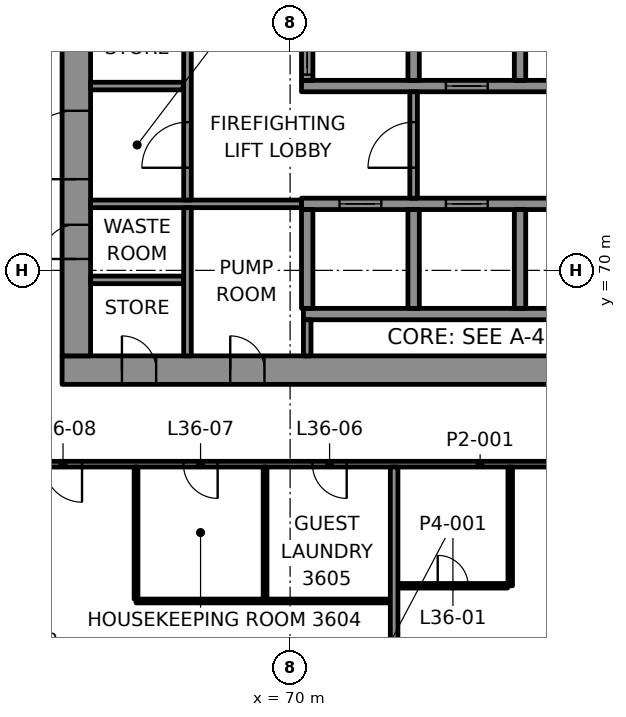
"""IFC4 building model, lengths in metres.
Left out: names, types, materials, properties, quantities, classifications, styles, units other than length and angle.
Written with IfcOpenShell. Run it as: python <this file> out.ifc"""

import sys

from ifc_helpers import new_model, si_unit, direction, frame, frame_2d, origin, place, context, subcontext, project, spatial, rectangle, extrude, element, fill, save


model = new_model("IFC4")
c1 = context("Model", 3, precision=1e-05, world=origin(), true_north=direction((0.0, 1.0)))
c2 = subcontext(c1, "Body", "Model", "MODEL_VIEW")
j1 = project(units=[si_unit("LENGTHUNIT", "METRE"), si_unit("PLANEANGLEUNIT", "RADIAN")], contexts=[c1])
p1 = place(None, origin())
s1 = spatial("IfcSite", under=j1, at=p1, CompositionType="ELEMENT")
p2 = place(p1, origin())
s2 = spatial("IfcBuilding", under=s1, at=p2, CompositionType="ELEMENT")
p3 = place(p2, frame((0.0, 0.0, 159.7)))
s3 = spatial("IfcBuildingStorey", under=s2, at=p3, CompositionType="ELEMENT", Elevation=159.7)
p4 = place(p3, frame((64.0, 67.375, 0.0), z_axis=(0.0, 0.0, 1.0), x_axis=(1.0, 0.0, 0.0)))
e1 = element("IfcWall", 1, at=p4, inside=s3, PredefinedType="SHEAR", context=c2, shape_type="SweptSolid", body=[
    extrude(rectangle(XDim=22.0, YDim=0.75, at=frame_2d((11.0, 0.0))), origin(), (0.0, 0.0, 1.0), 3.7),
])
p5 = place(p4, frame((1.575, 0.0, 0.0)))
e2 = element("IfcOpeningElement", 2, at=p5, cuts=e1, PredefinedType="OPENING", context=c2, shape_type="SweptSolid", body=[
    extrude(rectangle(XDim=0.9, YDim=2.1, at=frame_2d((0.45, 1.05))), frame((0.0, 0.385, 0.0), z_axis=(0.0, -1.0, 0.0), x_axis=(1.0, 0.0, 0.0)), (0.0, 0.0, 1.0), 0.77),
])
p6 = place(p4, frame((4.425, 0.0, 0.0)))
e3 = element("IfcOpeningElement", 3, at=p6, cuts=e1, PredefinedType="OPENING", context=c2, shape_type="SweptSolid", body=[
    extrude(rectangle(XDim=0.9, YDim=2.1, at=frame_2d((0.45, 1.05))), frame((0.0, 0.385, 0.0), z_axis=(0.0, -1.0, 0.0), x_axis=(1.0, 0.0, 0.0)), (0.0, 0.0, 1.0), 0.77),
])
p7 = place(p3, frame((64.375, 67.75, 0.0), z_axis=(0.0, 0.0, 1.0), x_axis=(0.0, 1.0, 0.0)))
e4 = element("IfcWall", 4, at=p7, inside=s3, PredefinedType="SHEAR", context=c2, shape_type="SweptSolid", body=[
    extrude(rectangle(XDim=14.5, YDim=0.75, at=frame_2d((7.25, 0.0))), origin(), (0.0, 0.0, 1.0), 3.7),
])
p8 = place(p7, frame((4.65, 0.0, 0.0)))
e5 = element("IfcOpeningElement", 5, at=p8, cuts=e4, PredefinedType="OPENING", context=c2, shape_type="SweptSolid", body=[
    extrude(rectangle(XDim=1.8, YDim=2.1, at=frame_2d((0.9, 1.05))), frame((0.0, 0.385, 0.0), z_axis=(0.0, -1.0, 0.0), x_axis=(1.0, 0.0, 0.0)), (0.0, 0.0, 1.0), 0.77),
])
p9 = place(p7, frame((2.55, 0.0, 0.0)))
e6 = element("IfcOpeningElement", 6, at=p9, cuts=e4, PredefinedType="OPENING", context=c2, shape_type="SweptSolid", body=[
    extrude(rectangle(XDim=0.9, YDim=2.1, at=frame_2d((0.45, 1.05))), frame((0.0, 0.385, 0.0), z_axis=(0.0, -1.0, 0.0), x_axis=(1.0, 0.0, 0.0)), (0.0, 0.0, 1.0), 0.77),
])
p10 = place(p7, frame((10.35, 0.0, 0.0)))
e7 = element("IfcOpeningElement", 7, at=p10, cuts=e4, PredefinedType="OPENING", context=c2, shape_type="SweptSolid", body=[
    extrude(rectangle(XDim=0.9, YDim=2.1, at=frame_2d((0.45, 1.05))), frame((0.0, 0.385, 0.0), z_axis=(0.0, -1.0, 0.0), x_axis=(1.0, 0.0, 0.0)), (0.0, 0.0, 1.0), 0.77),
])
p11 = place(p3, frame((70.35, 68.85, 0.0), z_axis=(0.0, 0.0, 1.0), x_axis=(1.0, 0.0, 0.0)))
e8 = element("IfcWall", 8, at=p11, inside=s3, PredefinedType="SHEAR", context=c2, shape_type="SweptSolid", body=[
    extrude(rectangle(XDim=14.2, YDim=0.3, at=frame_2d((7.1, 0.0))), origin(), (0.0, 0.0, 1.0), 3.7),
])
p12 = place(p3, frame((70.3, 71.75, 0.0), z_axis=(0.0, 0.0, 1.0), x_axis=(1.0, 0.0, 0.0)))
e9 = element("IfcWall", 9, at=p12, inside=s3, PredefinedType="SHEAR", context=c2, shape_type="SweptSolid", body=[
    extrude(rectangle(XDim=14.3, YDim=0.3, at=frame_2d((7.15, 0.0))), origin(), (0.0, 0.0, 1.0), 3.7),
])
p13 = place(p12, frame((1.0, 0.0, 0.0)))
e10 = element("IfcOpeningElement", 10, at=p13, cuts=e9, PredefinedType="OPENING", context=c2, shape_type="SweptSolid", body=[
    extrude(rectangle(XDim=1.1, YDim=2.1, at=frame_2d((0.55, 1.05))), frame((0.0, 0.16, 0.0), z_axis=(0.0, -1.0, 0.0), x_axis=(1.0, 0.0, 0.0)), (0.0, 0.0, 1.0), 0.32),
])
p14 = place(p12, frame((3.8, 0.0, 0.0)))
e11 = element("IfcOpeningElement", 11, at=p14, cuts=e9, PredefinedType="OPENING", context=c2, shape_type="SweptSolid", body=[
    extrude(rectangle(XDim=1.1, YDim=2.1, at=frame_2d((0.55, 1.05))), frame((0.0, 0.16, 0.0), z_axis=(0.0, -1.0, 0.0), x_axis=(1.0, 0.0, 0.0)), (0.0, 0.0, 1.0), 0.32),
])
p15 = place(p12, frame((6.6, 0.0, 0.0)))
e12 = element("IfcOpeningElement", 12, at=p15, cuts=e9, PredefinedType="OPENING", context=c2, shape_type="SweptSolid", body=[
    extrude(rectangle(XDim=1.1, YDim=2.1, at=frame_2d((0.55, 1.05))), frame((0.0, 0.16, 0.0), z_axis=(0.0, -1.0, 0.0), x_axis=(1.0, 0.0, 0.0)), (0.0, 0.0, 1.0), 0.32),
])
p16 = place(p12, frame((9.4, 0.0, 0.0)))
e13 = element("IfcOpeningElement", 13, at=p16, cuts=e9, PredefinedType="OPENING", context=c2, shape_type="SweptSolid", body=[
    extrude(rectangle(XDim=1.1, YDim=2.1, at=frame_2d((0.55, 1.05))), frame((0.0, 0.16, 0.0), z_axis=(0.0, -1.0, 0.0), x_axis=(1.0, 0.0, 0.0)), (0.0, 0.0, 1.0), 0.32),
])
p17 = place(p12, frame((12.2, 0.0, 0.0)))
e14 = element("IfcOpeningElement", 14, at=p17, cuts=e9, PredefinedType="OPENING", context=c2, shape_type="SweptSolid", body=[
    extrude(rectangle(XDim=1.1, YDim=2.1, at=frame_2d((0.55, 1.05))), frame((0.0, 0.16, 0.0), z_axis=(0.0, -1.0, 0.0), x_axis=(1.0, 0.0, 0.0)), (0.0, 0.0, 1.0), 0.32),
])
p18 = place(p3, frame((70.3, 74.85, 0.0), z_axis=(0.0, 0.0, 1.0), x_axis=(1.0, 0.0, 0.0)))
e15 = element("IfcWall", 15, at=p18, inside=s3, PredefinedType="SHEAR", context=c2, shape_type="SweptSolid", body=[
    extrude(rectangle(XDim=14.3, YDim=0.3, at=frame_2d((7.15, 0.0))), origin(), (0.0, 0.0, 1.0), 3.7),
])
p19 = place(p18, frame((3.8, 0.0, 0.0)))
e16 = element("IfcOpeningElement", 16, at=p19, cuts=e15, PredefinedType="OPENING", context=c2, shape_type="SweptSolid", body=[
    extrude(rectangle(XDim=1.1, YDim=2.1, at=frame_2d((0.55, 1.05))), frame((0.0, 0.16, 0.0), z_axis=(0.0, -1.0, 0.0), x_axis=(1.0, 0.0, 0.0)), (0.0, 0.0, 1.0), 0.32),
])
p20 = place(p18, frame((12.2, 0.0, 0.0)))
e17 = element("IfcOpeningElement", 17, at=p20, cuts=e15, PredefinedType="OPENING", context=c2, shape_type="SweptSolid", body=[
    extrude(rectangle(XDim=1.1, YDim=2.1, at=frame_2d((0.55, 1.05))), frame((0.0, 0.16, 0.0), z_axis=(0.0, -1.0, 0.0), x_axis=(1.0, 0.0, 0.0)), (0.0, 0.0, 1.0), 0.32),
])
p21 = place(p3, frame((70.45, 69.0, 0.0), z_axis=(0.0, 0.0, 1.0), x_axis=(0.0, 1.0, 0.0)))
e18 = element("IfcWall", 18, at=p21, inside=s3, PredefinedType="SHEAR", context=c2, shape_type="SweptSolid", body=[
    extrude(rectangle(XDim=2.6, YDim=0.3, at=frame_2d((1.3, 0.0))), origin(), (0.0, 0.0, 1.0), 3.7),
])
p22 = place(p3, frame((70.45, 75.0, 0.0), z_axis=(0.0, 0.0, 1.0), x_axis=(0.0, 1.0, 0.0)))
e19 = element("IfcWall", 19, at=p22, inside=s3, PredefinedType="SHEAR", context=c2, shape_type="SweptSolid", body=[
    extrude(rectangle(XDim=2.6, YDim=0.3, at=frame_2d((1.3, 0.0))), origin(), (0.0, 0.0, 1.0), 3.7),
])
p23 = place(p22, frame((0.15, 0.0, 0.0)))
e20 = element("IfcOpeningElement", 20, at=p23, cuts=e19, PredefinedType="OPENING", context=c2, shape_type="SweptSolid", body=[
    extrude(rectangle(XDim=1.1, YDim=2.1, at=frame_2d((0.55, 1.05))), frame((0.0, 0.16, 0.0), z_axis=(0.0, -1.0, 0.0), x_axis=(1.0, 0.0, 0.0)), (0.0, 0.0, 1.0), 0.32),
])
for number, where, z_axis, x_axis in (
    (21, (73.25, 69.0, 0.0), (0.0, 0.0, 1.0), (0.0, 1.0, 0.0)),
    (22, (73.25, 75.0, 0.0), (0.0, 0.0, 1.0), (0.0, 1.0, 0.0)),
    (23, (76.05, 69.0, 0.0), (0.0, 0.0, 1.0), (0.0, 1.0, 0.0)),
    (24, (76.05, 75.0, 0.0), (0.0, 0.0, 1.0), (0.0, 1.0, 0.0)),
):
    element("IfcWall", number, at=place(p3, frame(where, z_axis=z_axis, x_axis=x_axis)), inside=s3, PredefinedType="SHEAR", context=c2, shape_type="SweptSolid", body=[
        extrude(rectangle(XDim=2.6, YDim=0.3, at=frame_2d((1.3, 0.0))), origin(), (0.0, 0.0, 1.0), 3.7),
    ])
p24 = place(p3, frame((65.946, 61.3, 0.0), z_axis=(0.0, 0.0, 1.0), x_axis=(1.0, 0.0, 0.0)))
e25 = element("IfcWall", 25, at=p24, inside=s3, PredefinedType="PARTITIONING", context=c2, shape_type="SweptSolid", body=[
    extrude(rectangle(XDim=6.69, YDim=0.1, at=frame_2d((3.345, 0.0))), origin(), (0.0, 0.0, 1.0), 3.1),
])
p25 = place(p3, frame((72.846, 61.7, 0.0), z_axis=(0.0, 0.0, 1.0), x_axis=(1.0, 0.0, 0.0)))
e26 = element("IfcWall", 26, at=p25, inside=s3, PredefinedType="PARTITIONING", context=c2, shape_type="SweptSolid", body=[
    extrude(rectangle(XDim=2.876, YDim=0.12, at=frame_2d((1.438, 0.0))), origin(), (0.0, 0.0, 1.0), 3.1),
])
p26 = place(p25, frame((1.038, 0.0, 0.0)))
e27 = element("IfcOpeningElement", 27, at=p26, cuts=e26, PredefinedType="OPENING", context=c2, shape_type="SweptSolid", body=[
    extrude(rectangle(XDim=0.8, YDim=2.1, at=frame_2d((0.4, 1.05))), frame((0.0, 0.07, 0.0), z_axis=(0.0, -1.0, 0.0), x_axis=(1.0, 0.0, 0.0)), (0.0, 0.0, 1.0), 0.14),
])
p27 = place(p3, frame((88.1, 64.9, 0.0), z_axis=(0.0, 0.0, 1.0), x_axis=(-1.0, 0.0, 0.0)))
e28 = element("IfcWall", 28, at=p27, inside=s3, PredefinedType="PARTITIONING", context=c2, shape_type="SweptSolid", body=[
    extrude(rectangle(XDim=26.199, YDim=0.15, at=frame_2d((13.1, 0.0))), origin(), (0.0, 0.0, 1.0), 3.1),
])
p28 = place(p27, frame((0.322, 0.0, 0.0)))
e29 = element("IfcOpeningElement", 29, at=p28, cuts=e28, PredefinedType="OPENING", context=c2, shape_type="SweptSolid", body=[
    extrude(rectangle(XDim=1.0, YDim=2.1, at=frame_2d((0.5, 1.05))), frame((0.0, 0.085, 0.0), z_axis=(0.0, -1.0, 0.0), x_axis=(1.0, 0.0, 0.0)), (0.0, 0.0, 1.0), 0.17),
])
p29 = place(p27, frame((5.859, 0.0, 0.0)))
e30 = element("IfcOpeningElement", 30, at=p29, cuts=e28, PredefinedType="OPENING", context=c2, shape_type="SweptSolid", body=[
    extrude(rectangle(XDim=0.9, YDim=2.1, at=frame_2d((0.45, 1.05))), frame((0.0, 0.085, 0.0), z_axis=(0.0, -1.0, 0.0), x_axis=(1.0, 0.0, 0.0)), (0.0, 0.0, 1.0), 0.17),
])
p30 = place(p27, frame((8.981, 0.0, 0.0)))
e31 = element("IfcOpeningElement", 31, at=p30, cuts=e28, PredefinedType="OPENING", context=c2, shape_type="SweptSolid", body=[
    extrude(rectangle(XDim=1.0, YDim=2.1, at=frame_2d((0.5, 1.05))), frame((0.0, 0.085, 0.0), z_axis=(0.0, -1.0, 0.0), x_axis=(1.0, 0.0, 0.0)), (0.0, 0.0, 1.0), 0.17),
])
p31 = place(p27, frame((16.611, 0.0, 0.0)))
e32 = element("IfcOpeningElement", 32, at=p31, cuts=e28, PredefinedType="OPENING", context=c2, shape_type="SweptSolid", body=[
    extrude(rectangle(XDim=0.9, YDim=2.1, at=frame_2d((0.45, 1.05))), frame((0.0, 0.085, 0.0), z_axis=(0.0, -1.0, 0.0), x_axis=(1.0, 0.0, 0.0)), (0.0, 0.0, 1.0), 0.17),
])
p32 = place(p27, frame((20.006, 0.0, 0.0)))
e33 = element("IfcOpeningElement", 33, at=p32, cuts=e28, PredefinedType="OPENING", context=c2, shape_type="SweptSolid", body=[
    extrude(rectangle(XDim=0.9, YDim=2.1, at=frame_2d((0.45, 1.05))), frame((0.0, 0.085, 0.0), z_axis=(0.0, -1.0, 0.0), x_axis=(1.0, 0.0, 0.0)), (0.0, 0.0, 1.0), 0.17),
])
p33 = place(p27, frame((23.575, 0.0, 0.0)))
e34 = element("IfcOpeningElement", 34, at=p33, cuts=e28, PredefinedType="OPENING", context=c2, shape_type="SweptSolid", body=[
    extrude(rectangle(XDim=1.0, YDim=2.1, at=frame_2d((0.5, 1.05))), frame((0.0, 0.085, 0.0), z_axis=(0.0, -1.0, 0.0), x_axis=(1.0, 0.0, 0.0)), (0.0, 0.0, 1.0), 0.17),
])
p34 = place(p3, frame((75.792, 61.7, 0.0), z_axis=(0.0, 0.0, 1.0), x_axis=(0.0, 1.0, 0.0)))
e35 = element("IfcWall", 35, at=p34, inside=s3, PredefinedType="PARTITIONING", context=c2, shape_type="SweptSolid", body=[
    extrude(rectangle(XDim=3.125, YDim=0.12, at=frame_2d((1.562, 0.0))), origin(), (0.0, 0.0, 1.0), 3.1),
])
p35 = place(p3, frame((72.737, 55.101, 0.0), z_axis=(0.0, 0.0, 1.0), x_axis=(0.0, 1.0, 0.0)))
e36 = element("IfcWall", 36, at=p35, inside=s3, PredefinedType="PARTITIONING", context=c2, shape_type="SweptSolid", body=[
    extrude(rectangle(XDim=9.724, YDim=0.2, at=frame_2d((4.862, 0.0))), origin(), (0.0, 0.0, 1.0), 2.865),
])
for number, where, z_axis, x_axis in (
    (37, (69.341, 61.35, 0.0), (0.0, 0.0, 1.0), (0.0, 1.0, 0.0)),
    (38, (65.946, 61.35, 0.0), (0.0, 0.0, 1.0), (0.0, 1.0, 0.0)),
):
    element("IfcWall", number, at=place(p3, frame(where, z_axis=z_axis, x_axis=x_axis)), inside=s3, PredefinedType="PARTITIONING", context=c2, shape_type="SweptSolid", body=[
        extrude(rectangle(XDim=3.475, YDim=0.1, at=frame_2d((1.737, 0.0))), origin(), (0.0, 0.0, 1.0), 3.1),
    ])
p36 = place(p3, frame((69.117, 111.388, 0.0), z_axis=(0.0, 0.0, 1.0), x_axis=(-0.49999896751, -0.866025999892, 0.0)))
e39 = element("IfcWall", 39, at=p36, inside=s3, PredefinedType="SOLIDWALL", context=c2, shape_type="SweptSolid", body=[
    extrude(rectangle(XDim=57.143, YDim=0.8, at=frame_2d((28.571, 0.0))), origin(), (0.0, 0.0, 1.0), 0.9),
])
p37 = place(p3, frame((64.75, 69.75, 0.0), z_axis=(0.0, 0.0, 1.0), x_axis=(1.0, 0.0, 0.0)))
e40 = element("IfcWall", 40, at=p37, inside=s3, PredefinedType="PARTITIONING", context=c2, shape_type="SweptSolid", body=[
    extrude(rectangle(XDim=2.45, YDim=0.2, at=frame_2d((1.225, 0.0))), origin(), (0.0, 0.0, 1.0), 3.7),
])
p38 = place(p3, frame((64.75, 71.75, 0.0), z_axis=(0.0, 0.0, 1.0), x_axis=(1.0, 0.0, 0.0)))
e41 = element("IfcWall", 41, at=p38, inside=s3, PredefinedType="PARTITIONING", context=c2, shape_type="SweptSolid", body=[
    extrude(rectangle(XDim=5.55, YDim=0.2, at=frame_2d((2.775, 0.0))), origin(), (0.0, 0.0, 1.0), 3.7),
])
p39 = place(p3, frame((64.75, 74.85, 0.0), z_axis=(0.0, 0.0, 1.0), x_axis=(1.0, 0.0, 0.0)))
e42 = element("IfcWall", 42, at=p39, inside=s3, PredefinedType="PARTITIONING", context=c2, shape_type="SweptSolid", body=[
    extrude(rectangle(XDim=2.45, YDim=0.2, at=frame_2d((1.225, 0.0))), origin(), (0.0, 0.0, 1.0), 3.7),
])
p40 = place(p3, frame((67.3, 67.75, 0.0), z_axis=(0.0, 0.0, 1.0), x_axis=(0.0, 1.0, 0.0)))
e43 = element("IfcWall", 43, at=p40, inside=s3, PredefinedType="PARTITIONING", context=c2, shape_type="SweptSolid", body=[
    extrude(rectangle(XDim=3.9, YDim=0.2, at=frame_2d((1.95, 0.0))), origin(), (0.0, 0.0, 1.0), 3.7),
])
p41 = place(p3, frame((67.3, 71.85, 0.0), z_axis=(0.0, 0.0, 1.0), x_axis=(0.0, 1.0, 0.0)))
e44 = element("IfcWall", 44, at=p41, inside=s3, PredefinedType="PARTITIONING", context=c2, shape_type="SweptSolid", body=[
    extrude(rectangle(XDim=5.75, YDim=0.2, at=frame_2d((2.875, 0.0))), origin(), (0.0, 0.0, 1.0), 3.7),
])
p42 = place(p41, frame((0.85, 0.0, 0.0)))
e45 = element("IfcOpeningElement", 45, at=p42, cuts=e44, PredefinedType="OPENING", context=c2, shape_type="SweptSolid", body=[
    extrude(rectangle(XDim=1.2, YDim=2.1, at=frame_2d((0.6, 1.05))), frame((0.0, 0.11, 0.0), z_axis=(0.0, -1.0, 0.0), x_axis=(1.0, 0.0, 0.0)), (0.0, 0.0, 1.0), 0.22),
])
p43 = place(p3, frame((70.45, 67.75, 0.0), z_axis=(0.0, 0.0, 1.0), x_axis=(0.0, 1.0, 0.0)))
e46 = element("IfcWall", 46, at=p43, inside=s3, PredefinedType="PARTITIONING", context=c2, shape_type="SweptSolid", body=[
    extrude(rectangle(XDim=0.95, YDim=0.2, at=frame_2d((0.475, 0.0))), origin(), (0.0, 0.0, 1.0), 3.7),
])
p44 = place(p3, frame((73.25, 71.9, 0.0), z_axis=(0.0, 0.0, 1.0), x_axis=(0.0, 1.0, 0.0)))
e47 = element("IfcWall", 47, at=p44, inside=s3, PredefinedType="PARTITIONING", context=c2, shape_type="SweptSolid", body=[
    extrude(rectangle(XDim=2.8, YDim=0.2, at=frame_2d((1.4, 0.0))), origin(), (0.0, 0.0, 1.0), 3.7),
])
p45 = place(p44, frame((0.8, 0.0, 0.0)))
e48 = element("IfcOpeningElement", 48, at=p45, cuts=e47, PredefinedType="OPENING", context=c2, shape_type="SweptSolid", body=[
    extrude(rectangle(XDim=1.2, YDim=2.1, at=frame_2d((0.6, 1.05))), frame((0.0, 0.11, 0.0), z_axis=(0.0, -1.0, 0.0), x_axis=(1.0, 0.0, 0.0)), (0.0, 0.0, 1.0), 0.22),
])
p46 = place(p26, origin())
e49 = element("IfcDoor", 49, at=p46, inside=s3, OperationType="SINGLE_SWING_RIGHT", PredefinedType="DOOR", context=c2, shape_type="SweptSolid", body=[
    extrude(rectangle(XDim=0.8, YDim=2.1, at=frame_2d((0.4, 1.05))), frame((0.0, 0.025, 0.0), z_axis=(0.0, -1.0, 0.0), x_axis=(1.0, 0.0, 0.0)), (0.0, 0.0, 1.0), 0.05),
])
fill(e27, e49)
p47 = place(p31, origin())
e50 = element("IfcDoor", 50, at=p47, inside=s3, OperationType="SINGLE_SWING_LEFT", PredefinedType="DOOR", context=c2, shape_type="SweptSolid", body=[
    extrude(rectangle(XDim=0.9, YDim=2.1, at=frame_2d((0.45, 1.05))), frame((0.0, 0.025, 0.0), z_axis=(0.0, -1.0, 0.0), x_axis=(1.0, 0.0, 0.0)), (0.0, 0.0, 1.0), 0.05),
])
fill(e32, e50)
p48 = place(p32, origin())
e51 = element("IfcDoor", 51, at=p48, inside=s3, OperationType="SINGLE_SWING_RIGHT", PredefinedType="DOOR", context=c2, shape_type="SweptSolid", body=[
    extrude(rectangle(XDim=0.9, YDim=2.1, at=frame_2d((0.45, 1.05))), frame((0.0, 0.025, 0.0), z_axis=(0.0, -1.0, 0.0), x_axis=(1.0, 0.0, 0.0)), (0.0, 0.0, 1.0), 0.05),
])
fill(e33, e51)
p49 = place(p33, origin())
e52 = element("IfcDoor", 52, at=p49, inside=s3, OperationType="SINGLE_SWING_LEFT", PredefinedType="DOOR", context=c2, shape_type="SweptSolid", body=[
    extrude(rectangle(XDim=1.0, YDim=2.1, at=frame_2d((0.5, 1.05))), frame((0.0, 0.025, 0.0), z_axis=(0.0, -1.0, 0.0), x_axis=(1.0, 0.0, 0.0)), (0.0, 0.0, 1.0), 0.05),
])
fill(e34, e52)
p50 = place(p13, origin())
e53 = element("IfcDoor", 53, at=p50, inside=s3, OperationType="DOUBLE_DOOR_SLIDING", PredefinedType="DOOR", context=c2, shape_type="SweptSolid", body=[
    extrude(rectangle(XDim=1.1, YDim=2.1, at=frame_2d((0.55, 1.05))), frame((0.0, 0.025, 0.0), z_axis=(0.0, -1.0, 0.0), x_axis=(1.0, 0.0, 0.0)), (0.0, 0.0, 1.0), 0.05),
])
fill(e10, e53)
p51 = place(p14, origin())
e54 = element("IfcDoor", 54, at=p51, inside=s3, OperationType="DOUBLE_DOOR_SLIDING", PredefinedType="DOOR", context=c2, shape_type="SweptSolid", body=[
    extrude(rectangle(XDim=1.1, YDim=2.1, at=frame_2d((0.55, 1.05))), frame((0.0, 0.025, 0.0), z_axis=(0.0, -1.0, 0.0), x_axis=(1.0, 0.0, 0.0)), (0.0, 0.0, 1.0), 0.05),
])
fill(e11, e54)
p52 = place(p23, origin())
e55 = element("IfcDoor", 55, at=p52, inside=s3, OperationType="DOUBLE_DOOR_SLIDING", PredefinedType="DOOR", context=c2, shape_type="SweptSolid", body=[
    extrude(rectangle(XDim=1.1, YDim=2.1, at=frame_2d((0.55, 1.05))), frame((0.0, 0.025, 0.0), z_axis=(0.0, -1.0, 0.0), x_axis=(1.0, 0.0, 0.0)), (0.0, 0.0, 1.0), 0.05),
])
fill(e20, e55)
p53 = place(p19, origin())
e56 = element("IfcDoor", 56, at=p53, inside=s3, OperationType="DOUBLE_DOOR_SLIDING", PredefinedType="DOOR", context=c2, shape_type="SweptSolid", body=[
    extrude(rectangle(XDim=1.1, YDim=2.1, at=frame_2d((0.55, 1.05))), frame((0.0, 0.025, 0.0), z_axis=(0.0, -1.0, 0.0), x_axis=(1.0, 0.0, 0.0)), (0.0, 0.0, 1.0), 0.05),
])
fill(e16, e56)
p54 = place(p45, origin())
e57 = element("IfcDoor", 57, at=p54, inside=s3, OperationType="SINGLE_SWING_LEFT", PredefinedType="DOOR", context=c2, shape_type="SweptSolid", body=[
    extrude(rectangle(XDim=1.2, YDim=2.1, at=frame_2d((0.6, 1.05))), frame((0.0, 0.025, 0.0), z_axis=(0.0, -1.0, 0.0), x_axis=(1.0, 0.0, 0.0)), (0.0, 0.0, 1.0), 0.05),
])
fill(e48, e57)
p55 = place(p42, origin())
e58 = element("IfcDoor", 58, at=p55, inside=s3, OperationType="SINGLE_SWING_RIGHT", PredefinedType="DOOR", context=c2, shape_type="SweptSolid", body=[
    extrude(rectangle(XDim=1.2, YDim=2.1, at=frame_2d((0.6, 1.05))), frame((0.0, 0.025, 0.0), z_axis=(0.0, -1.0, 0.0), x_axis=(1.0, 0.0, 0.0)), (0.0, 0.0, 1.0), 0.05),
])
fill(e45, e58)
p56 = place(p8, origin())
e59 = element("IfcDoor", 59, at=p56, inside=s3, OperationType="SINGLE_SWING_LEFT", PredefinedType="DOOR", context=c2, shape_type="SweptSolid", body=[
    extrude(rectangle(XDim=1.8, YDim=2.1, at=frame_2d((0.9, 1.05))), frame((0.0, 0.095, 0.0), z_axis=(0.0, -1.0, 0.0), x_axis=(1.0, 0.0, 0.0)), (0.0, 0.0, 1.0), 0.19),
])
fill(e5, e59)
p57 = place(p5, origin())
e60 = element("IfcDoor", 60, at=p57, inside=s3, OperationType="SINGLE_SWING_LEFT", PredefinedType="DOOR", context=c2, shape_type="SweptSolid", body=[
    extrude(rectangle(XDim=0.9, YDim=2.1, at=frame_2d((0.45, 1.05))), frame((0.0, 0.095, 0.0), z_axis=(0.0, -1.0, 0.0), x_axis=(1.0, 0.0, 0.0)), (0.0, 0.0, 1.0), 0.19),
])
fill(e2, e60)
p58 = place(p9, origin())
e61 = element("IfcDoor", 61, at=p58, inside=s3, OperationType="SINGLE_SWING_RIGHT", PredefinedType="DOOR", context=c2, shape_type="SweptSolid", body=[
    extrude(rectangle(XDim=0.9, YDim=2.1, at=frame_2d((0.45, 1.05))), frame((0.0, 0.095, 0.0), z_axis=(0.0, -1.0, 0.0), x_axis=(1.0, 0.0, 0.0)), (0.0, 0.0, 1.0), 0.19),
])
fill(e6, e61)
p59 = place(p6, origin())
e62 = element("IfcDoor", 62, at=p59, inside=s3, OperationType="SINGLE_SWING_LEFT", PredefinedType="DOOR", context=c2, shape_type="SweptSolid", body=[
    extrude(rectangle(XDim=0.9, YDim=2.1, at=frame_2d((0.45, 1.05))), frame((0.0, 0.095, 0.0), z_axis=(0.0, -1.0, 0.0), x_axis=(1.0, 0.0, 0.0)), (0.0, 0.0, 1.0), 0.19),
])
fill(e3, e62)
save(model, sys.argv[1])
